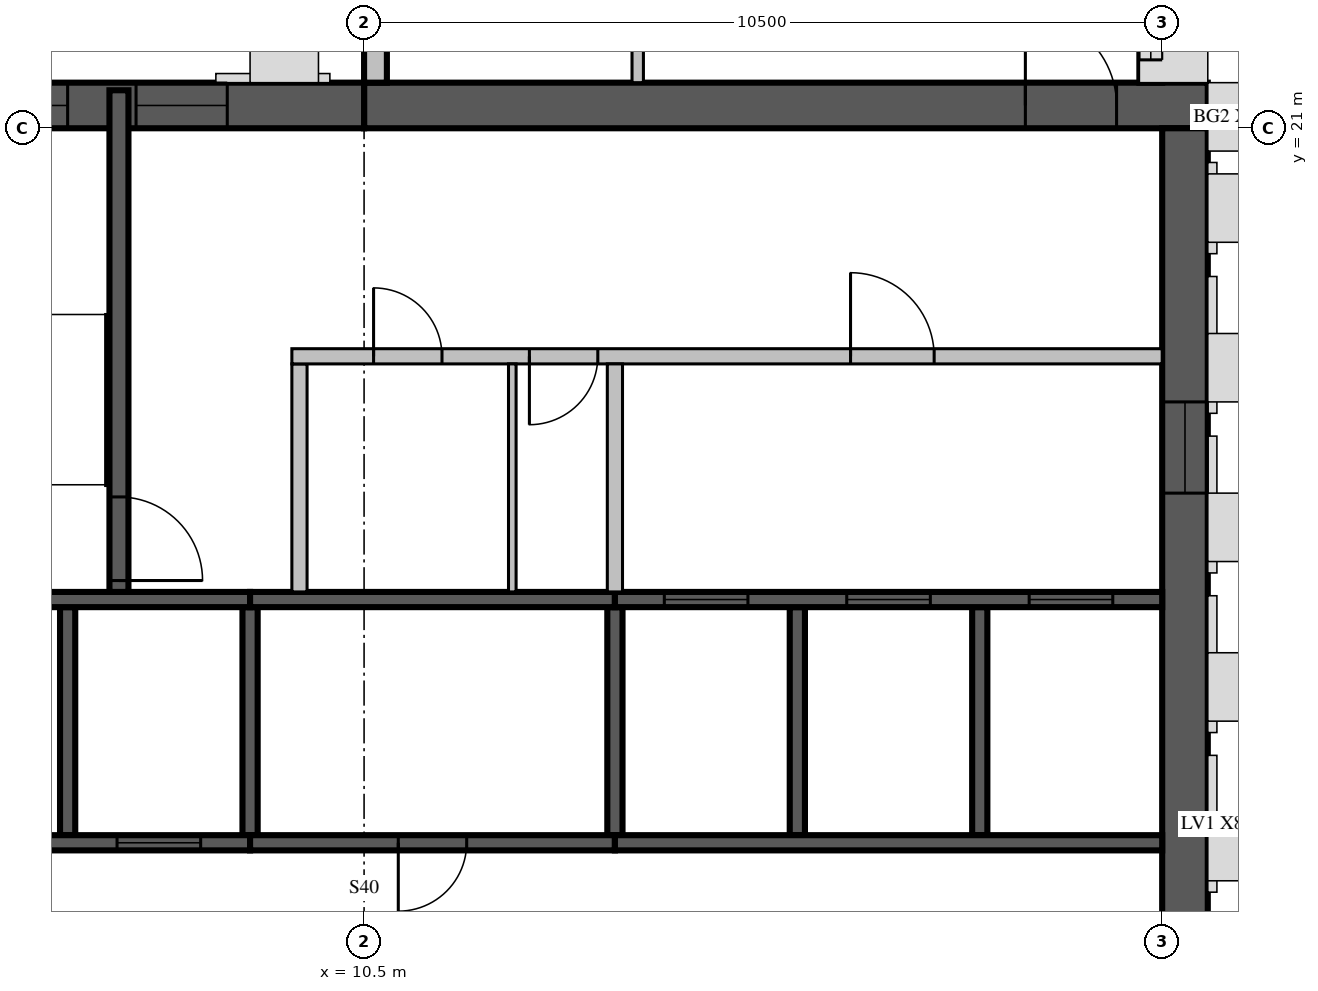
"""IFC4 building model, lengths in metres.
Left out: names, types, materials, properties, quantities, classifications, styles, units other than length and angle.
Written with IfcOpenShell. Run it as: python <this file> out.ifc"""

import sys

from ifc_helpers import new_model, si_unit, direction, frame, frame_2d, origin, place, context, subcontext, project, spatial, rectangle, extrude, source, transform, mapped, element, fill, save


model = new_model("IFC4")
c1 = context("Model", 3, precision=1e-05, world=origin(), true_north=direction((0.0, 1.0)))
c2 = subcontext(c1, "Body", "Model", "MODEL_VIEW")
j1 = project(units=[si_unit("LENGTHUNIT", "METRE"), si_unit("PLANEANGLEUNIT", "RADIAN")], contexts=[c1])
p1 = place(None, origin())
s1 = spatial("IfcSite", under=j1, at=p1, CompositionType="ELEMENT")
p2 = place(p1, origin())
s2 = spatial("IfcBuilding", under=s1, at=p2, CompositionType="ELEMENT")
p3 = place(p2, frame((0.0, 0.0, 365.0)))
s3 = spatial("IfcBuildingStorey", under=s2, at=p3, CompositionType="ELEMENT", Elevation=365.0)
m1 = source(origin(), c2, "Body", "SweptSolid", [
    extrude(rectangle(XDim=11.1, YDim=0.6, at=frame_2d((5.55, 0.0))), origin(), (0.0, 0.0, 1.0), 3.5),
])
p4 = place(p3, frame((10.5, 21.3, 0.0), z_axis=(0.0, 0.0, 1.0), x_axis=(1.0, 0.0, 0.0)))
e1 = element("IfcWall", 1, at=p4, inside=s3, PredefinedType="SHEAR", context=c2, shape_type="MappedRepresentation", body=[
    mapped(m1, transform((0.0, 0.0, 0.0), scale=1.0)),
])
m2 = source(origin(), c2, "Body", "SweptSolid", [
    extrude(rectangle(XDim=1.2, YDim=2.1, at=frame_2d((0.6, 1.05))), frame((0.0, 0.31, 0.0), z_axis=(0.0, -1.0, 0.0), x_axis=(1.0, 0.0, 0.0)), (0.0, 0.0, 1.0), 0.62),
])
p5 = place(p4, frame((8.7, 0.0, 0.0)))
e2 = element("IfcOpeningElement", 2, at=p5, cuts=e1, PredefinedType="OPENING", context=c2, shape_type="MappedRepresentation", body=[
    mapped(m2, transform((0.0, 0.0, 0.0), scale=1.0)),
])
m3 = source(origin(), c2, "Body", "SweptSolid", [
    extrude(rectangle(XDim=10.5, YDim=0.6, at=frame_2d((5.25, 0.0))), origin(), (0.0, 0.0, 1.0), 3.5),
])
p6 = place(p3, frame((21.3, 10.5, 0.0), z_axis=(0.0, 0.0, 1.0), x_axis=(0.0, 1.0, 0.0)))
e3 = element("IfcWall", 3, at=p6, inside=s3, PredefinedType="SHEAR", context=c2, shape_type="MappedRepresentation", body=[
    mapped(m3, transform((0.0, 0.0, 0.0), scale=1.0)),
])
m4 = source(origin(), c2, "Body", "SweptSolid", [
    extrude(rectangle(XDim=1.2, YDim=2.4, at=frame_2d((0.6, 1.2))), frame((0.0, 0.31, 0.0), z_axis=(0.0, -1.0, 0.0), x_axis=(1.0, 0.0, 0.0)), (0.0, 0.0, 1.0), 0.62),
])
p7 = place(p6, frame((5.7, 0.0, 0.6)))
e4 = element("IfcOpeningElement", 4, at=p7, cuts=e3, PredefinedType="OPENING", context=c2, shape_type="MappedRepresentation", body=[
    mapped(m4, transform((0.0, 0.0, 0.0), scale=1.0)),
])
m5 = source(origin(), c2, "Body", "SweptSolid", [
    extrude(rectangle(XDim=6.6, YDim=0.6, at=frame_2d((3.3, 0.0))), origin(), (0.0, 0.0, 1.0), 3.5),
])
p8 = place(p3, frame((3.9, 21.3, 0.0), z_axis=(0.0, 0.0, 1.0), x_axis=(1.0, 0.0, 0.0)))
e5 = element("IfcWall", 5, at=p8, inside=s3, PredefinedType="SHEAR", context=c2, shape_type="MappedRepresentation", body=[
    mapped(m5, transform((0.0, 0.0, 0.0), scale=1.0)),
])
p9 = place(p8, frame((1.5, 0.0, 0.6)))
e6 = element("IfcOpeningElement", 6, at=p9, cuts=e5, PredefinedType="OPENING", context=c2, shape_type="MappedRepresentation", body=[
    mapped(m4, transform((0.0, 0.0, 0.0), scale=1.0)),
])
p10 = place(p8, frame((3.6, 0.0, 0.6)))
e7 = element("IfcOpeningElement", 7, at=p10, cuts=e5, PredefinedType="OPENING", context=c2, shape_type="MappedRepresentation", body=[
    mapped(m4, transform((0.0, 0.0, 0.0), scale=1.0)),
])
m6 = source(origin(), c2, "Body", "SweptSolid", [
    extrude(rectangle(XDim=7.5, YDim=0.3, at=frame_2d((3.75, 0.0))), origin(), (0.0, 0.0, 1.0), 3.05),
])
p11 = place(p3, frame((20.85, 21.6, 0.0), z_axis=(0.0, 0.0, 1.0), x_axis=(0.0, 1.0, 0.0)))
e8 = element("IfcWall", 8, at=p11, inside=s3, PredefinedType="STANDARD", context=c2, shape_type="MappedRepresentation", body=[
    mapped(m6, transform((0.0, 0.0, 0.0), scale=1.0)),
])
m7 = source(origin(), c2, "Body", "SweptSolid", [
    extrude(rectangle(XDim=2.4, YDim=2.0, at=frame_2d((1.2, 1.0))), frame((0.0, 0.16, 0.0), z_axis=(0.0, -1.0, 0.0), x_axis=(1.0, 0.0, 0.0)), (0.0, 0.0, 1.0), 0.32),
])
p12 = place(p11, frame((0.3, 0.0, 0.6)))
e9 = element("IfcOpeningElement", 9, at=p12, cuts=e8, PredefinedType="OPENING", context=c2, shape_type="MappedRepresentation", body=[
    mapped(m7, transform((0.0, 0.0, 0.0), scale=1.0)),
])
m8 = source(origin(), c2, "Body", "SweptSolid", [
    extrude(rectangle(XDim=3.0, YDim=2.0, at=frame_2d((1.5, 1.0))), frame((0.0, 0.16, 0.0), z_axis=(0.0, -1.0, 0.0), x_axis=(1.0, 0.0, 0.0)), (0.0, 0.0, 1.0), 0.32),
])
p13 = place(p11, frame((4.2, 0.0, 0.6)))
e10 = element("IfcOpeningElement", 10, at=p13, cuts=e8, PredefinedType="OPENING", context=c2, shape_type="MappedRepresentation", body=[
    mapped(m8, transform((0.0, 0.0, 0.0), scale=1.0)),
])
p14 = place(p3, frame((10.65, 26.88, 0.0), z_axis=(0.0, 0.0, 1.0), x_axis=(0.0, -1.0, 0.0)))
e11 = element("IfcWall", 11, at=p14, inside=s3, PredefinedType="STANDARD", context=c2, shape_type="SweptSolid", body=[
    extrude(rectangle(XDim=5.28, YDim=0.3, at=frame_2d((2.64, 0.0))), origin(), (0.0, 0.0, 1.0), 3.05),
])
m9 = source(origin(), c2, "Body", "SweptSolid", [
    extrude(rectangle(XDim=3.6, YDim=2.0, at=frame_2d((1.8, 1.0))), frame((0.0, 0.16, 0.0), z_axis=(0.0, -1.0, 0.0), x_axis=(1.0, 0.0, 0.0)), (0.0, 0.0, 1.0), 0.32),
])
p15 = place(p14, frame((1.14, 0.0, 0.6)))
e12 = element("IfcOpeningElement", 12, at=p15, cuts=e11, PredefinedType="OPENING", context=c2, shape_type="MappedRepresentation", body=[
    mapped(m9, transform((0.0, 0.0, 0.0), scale=1.0)),
])
m10 = source(origin(), c2, "Body", "SweptSolid", [
    extrude(rectangle(XDim=3.0, YDim=0.2, at=frame_2d((1.5, 0.0))), origin(), (0.0, 0.0, 1.0), 3.5),
])
p16 = place(p3, frame((6.6, 11.7, 0.0), z_axis=(0.0, 0.0, 1.0), x_axis=(0.0, 1.0, 0.0)))
e13 = element("IfcWall", 13, at=p16, inside=s3, PredefinedType="SOLIDWALL", context=c2, shape_type="MappedRepresentation", body=[
    mapped(m10, transform((0.0, 0.0, 0.0), scale=1.0)),
])
p17 = place(p3, frame((9.0, 11.7, 0.0), z_axis=(0.0, 0.0, 1.0), x_axis=(0.0, 1.0, 0.0)))
e14 = element("IfcWall", 14, at=p17, inside=s3, PredefinedType="SOLIDWALL", context=c2, shape_type="SweptSolid", body=[
    extrude(rectangle(XDim=3.0, YDim=0.2, at=frame_2d((1.5, 0.0))), origin(), (0.0, 0.0, 1.0), 3.05),
])
m11 = source(origin(), c2, "Body", "SweptSolid", [
    extrude(rectangle(XDim=3.0, YDim=0.2, at=frame_2d((1.5, 0.0))), origin(), (0.0, 0.0, 1.0), 3.05),
])
p18 = place(p3, frame((13.8, 11.7, 0.0), z_axis=(0.0, 0.0, 1.0), x_axis=(0.0, 1.0, 0.0)))
e15 = element("IfcWall", 15, at=p18, inside=s3, PredefinedType="SOLIDWALL", context=c2, shape_type="MappedRepresentation", body=[
    mapped(m11, transform((0.0, 0.0, 0.0), scale=1.0)),
])
for number, where, z_axis, x_axis in (
    (16, (16.2, 11.7, 0.0), (0.0, 0.0, 1.0), (0.0, 1.0, 0.0)),
    (17, (18.6, 11.7, 0.0), (0.0, 0.0, 1.0), (0.0, 1.0, 0.0)),
):
    element("IfcWall", number, at=place(p3, frame(where, z_axis=z_axis, x_axis=x_axis)), inside=s3, PredefinedType="SOLIDWALL", context=c2, shape_type="MappedRepresentation", body=[
        mapped(m10, transform((0.0, 0.0, 0.0), scale=1.0)),
    ])
m12 = source(origin(), c2, "Body", "SweptSolid", [
    extrude(rectangle(XDim=4.8, YDim=0.2, at=frame_2d((2.4, 0.0))), origin(), (0.0, 0.0, 1.0), 3.5),
])
p19 = place(p3, frame((4.2, 11.6, 0.0), z_axis=(0.0, 0.0, 1.0), x_axis=(1.0, 0.0, 0.0)))
e18 = element("IfcWall", 18, at=p19, inside=s3, PredefinedType="SOLIDWALL", context=c2, shape_type="MappedRepresentation", body=[
    mapped(m12, transform((0.0, 0.0, 0.0), scale=1.0)),
])
m13 = source(origin(), c2, "Body", "SweptSolid", [
    extrude(rectangle(XDim=1.1, YDim=2.1, at=frame_2d((0.55, 1.05))), frame((0.0, 0.11, 0.0), z_axis=(0.0, -1.0, 0.0), x_axis=(1.0, 0.0, 0.0)), (0.0, 0.0, 1.0), 0.22),
])
p20 = place(p19, frame((0.65, 0.0, 0.0)))
e19 = element("IfcOpeningElement", 19, at=p20, cuts=e18, PredefinedType="OPENING", context=c2, shape_type="MappedRepresentation", body=[
    mapped(m13, transform((0.0, 0.0, 0.0), scale=1.0)),
])
p21 = place(p19, frame((3.05, 0.0, 0.0)))
e20 = element("IfcOpeningElement", 20, at=p21, cuts=e18, PredefinedType="OPENING", context=c2, shape_type="MappedRepresentation", body=[
    mapped(m13, transform((0.0, 0.0, 0.0), scale=1.0)),
])
p22 = place(p3, frame((9.0, 11.6, 0.0), z_axis=(0.0, 0.0, 1.0), x_axis=(1.0, 0.0, 0.0)))
e21 = element("IfcWall", 21, at=p22, inside=s3, PredefinedType="SOLIDWALL", context=c2, shape_type="SweptSolid", body=[
    extrude(rectangle(XDim=4.8, YDim=0.2, at=frame_2d((2.4, 0.0))), origin(), (0.0, 0.0, 1.0), 3.05),
])
m14 = source(origin(), c2, "Body", "SweptSolid", [
    extrude(rectangle(XDim=0.9, YDim=2.1, at=frame_2d((0.45, 1.05))), frame((0.0, 0.11, 0.0), z_axis=(0.0, -1.0, 0.0), x_axis=(1.0, 0.0, 0.0)), (0.0, 0.0, 1.0), 0.22),
])
p23 = place(p22, frame((1.95, 0.0, 0.0)))
e22 = element("IfcOpeningElement", 22, at=p23, cuts=e21, PredefinedType="OPENING", context=c2, shape_type="MappedRepresentation", body=[
    mapped(m14, transform((0.0, 0.0, 0.0), scale=1.0)),
])
m15 = source(origin(), c2, "Body", "SweptSolid", [
    extrude(rectangle(XDim=7.2, YDim=0.2, at=frame_2d((3.6, 0.0))), origin(), (0.0, 0.0, 1.0), 3.5),
])
p24 = place(p3, frame((13.8, 11.6, 0.0), z_axis=(0.0, 0.0, 1.0), x_axis=(1.0, 0.0, 0.0)))
e23 = element("IfcWall", 23, at=p24, inside=s3, PredefinedType="SOLIDWALL", context=c2, shape_type="MappedRepresentation", body=[
    mapped(m15, transform((0.0, 0.0, 0.0), scale=1.0)),
])
p25 = place(p3, frame((4.2, 14.8, 0.0), z_axis=(0.0, 0.0, 1.0), x_axis=(1.0, 0.0, 0.0)))
e24 = element("IfcWall", 24, at=p25, inside=s3, PredefinedType="SOLIDWALL", context=c2, shape_type="MappedRepresentation", body=[
    mapped(m12, transform((0.0, 0.0, 0.0), scale=1.0)),
])
m16 = source(origin(), c2, "Body", "SweptSolid", [
    extrude(rectangle(XDim=4.8, YDim=0.2, at=frame_2d((2.4, 0.0))), origin(), (0.0, 0.0, 1.0), 3.05),
])
p26 = place(p3, frame((9.0, 14.8, 0.0), z_axis=(0.0, 0.0, 1.0), x_axis=(1.0, 0.0, 0.0)))
e25 = element("IfcWall", 25, at=p26, inside=s3, PredefinedType="SOLIDWALL", context=c2, shape_type="MappedRepresentation", body=[
    mapped(m16, transform((0.0, 0.0, 0.0), scale=1.0)),
])
p27 = place(p3, frame((13.8, 14.8, 0.0), z_axis=(0.0, 0.0, 1.0), x_axis=(1.0, 0.0, 0.0)))
e26 = element("IfcWall", 26, at=p27, inside=s3, PredefinedType="SOLIDWALL", context=c2, shape_type="MappedRepresentation", body=[
    mapped(m15, transform((0.0, 0.0, 0.0), scale=1.0)),
])
p28 = place(p27, frame((0.65, 0.0, 0.0)))
e27 = element("IfcOpeningElement", 27, at=p28, cuts=e26, PredefinedType="OPENING", context=c2, shape_type="MappedRepresentation", body=[
    mapped(m13, transform((0.0, 0.0, 0.0), scale=1.0)),
])
p29 = place(p27, frame((3.05, 0.0, 0.0)))
e28 = element("IfcOpeningElement", 28, at=p29, cuts=e26, PredefinedType="OPENING", context=c2, shape_type="MappedRepresentation", body=[
    mapped(m13, transform((0.0, 0.0, 0.0), scale=1.0)),
])
p30 = place(p27, frame((5.45, 0.0, 0.0)))
e29 = element("IfcOpeningElement", 29, at=p30, cuts=e26, PredefinedType="OPENING", context=c2, shape_type="MappedRepresentation", body=[
    mapped(m13, transform((0.0, 0.0, 0.0), scale=1.0)),
])
p31 = place(p3, frame((7.275, 14.9, 0.0), z_axis=(0.0, 0.0, 1.0), x_axis=(0.0, 1.0, 0.0)))
e30 = element("IfcWall", 30, at=p31, inside=s3, PredefinedType="SOLIDWALL", context=c2, shape_type="SweptSolid", body=[
    extrude(rectangle(XDim=6.6, YDim=0.25, at=frame_2d((3.3, 0.0))), origin(), (0.0, 0.0, 1.0), 3.05),
])
m17 = source(origin(), c2, "Body", "SweptSolid", [
    extrude(rectangle(XDim=1.1, YDim=2.1, at=frame_2d((0.55, 1.05))), frame((0.0, 0.135, 0.0), z_axis=(0.0, -1.0, 0.0), x_axis=(1.0, 0.0, 0.0)), (0.0, 0.0, 1.0), 0.27),
])
p32 = place(p31, frame((0.15, 0.0, 0.0)))
e31 = element("IfcOpeningElement", 31, at=p32, cuts=e30, PredefinedType="OPENING", context=c2, shape_type="MappedRepresentation", body=[
    mapped(m17, transform((0.0, 0.0, 0.0), scale=1.0)),
])
p33 = place(p3, frame((9.65, 14.9, 0.0), z_axis=(0.0, 0.0, 1.0), x_axis=(0.0, 1.0, 0.0)))
e32 = element("IfcWall", 32, at=p33, inside=s3, PredefinedType="PARTITIONING", context=c2, shape_type="SweptSolid", body=[
    extrude(rectangle(XDim=3.0, YDim=0.2, at=frame_2d((1.5, 0.0))), origin(), (0.0, 0.0, 1.0), 3.05),
])
p34 = place(p3, frame((9.55, 18.0, 0.0), z_axis=(0.0, 0.0, 1.0), x_axis=(1.0, 0.0, 0.0)))
e33 = element("IfcWall", 33, at=p34, inside=s3, PredefinedType="PARTITIONING", context=c2, shape_type="SweptSolid", body=[
    extrude(rectangle(XDim=11.45, YDim=0.2, at=frame_2d((5.725, 0.0))), origin(), (0.0, 0.0, 1.0), 3.05),
])
p35 = place(p34, frame((1.075, 0.0, 0.0)))
e34 = element("IfcOpeningElement", 34, at=p35, cuts=e33, PredefinedType="OPENING", context=c2, shape_type="MappedRepresentation", body=[
    mapped(m14, transform((0.0, 0.0, 0.0), scale=1.0)),
])
p36 = place(p34, frame((3.125, 0.0, 0.0)))
e35 = element("IfcOpeningElement", 35, at=p36, cuts=e33, PredefinedType="OPENING", context=c2, shape_type="MappedRepresentation", body=[
    mapped(m14, transform((0.0, 0.0, 0.0), scale=1.0)),
])
p37 = place(p34, frame((7.35, 0.0, 0.0)))
e36 = element("IfcOpeningElement", 36, at=p37, cuts=e33, PredefinedType="OPENING", context=c2, shape_type="MappedRepresentation", body=[
    mapped(m13, transform((0.0, 0.0, 0.0), scale=1.0)),
])
m18 = source(origin(), c2, "Body", "SweptSolid", [
    extrude(rectangle(XDim=3.0, YDim=0.2, at=frame_2d((1.5, 0.0))), origin(), (0.0, 0.0, 1.0), 3.05),
])
p38 = place(p3, frame((13.8, 14.9, 0.0), z_axis=(0.0, 0.0, 1.0), x_axis=(0.0, 1.0, 0.0)))
e37 = element("IfcWall", 37, at=p38, inside=s3, PredefinedType="PARTITIONING", context=c2, shape_type="MappedRepresentation", body=[
    mapped(m18, transform((0.0, 0.0, 0.0), scale=1.0)),
])
p39 = place(p3, frame((12.45, 14.9, 0.0), z_axis=(0.0, 0.0, 1.0), x_axis=(0.0, 1.0, 0.0)))
e38 = element("IfcWall", 38, at=p39, inside=s3, PredefinedType="PARTITIONING", context=c2, shape_type="SweptSolid", body=[
    extrude(rectangle(XDim=3.0, YDim=0.1, at=frame_2d((1.5, 0.0))), origin(), (0.0, 0.0, 1.0), 3.05),
])
m19 = source(origin(), c2, "Body", "SweptSolid", [
    extrude(rectangle(XDim=7.725, YDim=0.15, at=frame_2d((3.862, 0.0))), origin(), (0.0, 0.0, 1.0), 3.05),
])
p40 = place(p3, frame((14.1, 29.325, 0.0), z_axis=(0.0, 0.0, 1.0), x_axis=(0.0, -1.0, 0.0)))
e39 = element("IfcWall", 39, at=p40, inside=s3, PredefinedType="PARTITIONING", context=c2, shape_type="MappedRepresentation", body=[
    mapped(m19, transform((0.0, 0.0, 0.0), scale=1.0)),
])
m20 = source(origin(), c2, "Body", "SweptSolid", [
    extrude(rectangle(XDim=2.2, YDim=2.1, at=frame_2d((1.1, 1.05))), frame((0.0, 0.085, 0.0), z_axis=(0.0, -1.0, 0.0), x_axis=(1.0, 0.0, 0.0)), (0.0, 0.0, 1.0), 0.17),
])
p41 = place(p40, frame((4.925, 0.0, 0.0)))
e40 = element("IfcOpeningElement", 40, at=p41, cuts=e39, PredefinedType="OPENING", context=c2, shape_type="MappedRepresentation", body=[
    mapped(m20, transform((0.0, 0.0, 0.0), scale=1.0)),
])
m21 = source(origin(), c2, "Body", "SweptSolid", [
    extrude(rectangle(XDim=2.4, YDim=2.0, at=frame_2d((1.2, 1.0))), frame((0.0, 0.03, 0.0), z_axis=(0.0, -1.0, 0.0), x_axis=(1.0, 0.0, 0.0)), (0.0, 0.0, 1.0), 0.06),
])
p42 = place(p12, origin())
e41 = element("IfcWindow", 41, at=p42, inside=s3, PartitioningType="SINGLE_PANEL", PredefinedType="WINDOW", context=c2, shape_type="MappedRepresentation", body=[
    mapped(m21, transform((0.0, 0.0, 0.0), scale=1.0)),
])
fill(e9, e41)
m22 = source(origin(), c2, "Body", "SweptSolid", [
    extrude(rectangle(XDim=1.1, YDim=2.1, at=frame_2d((0.55, 1.05))), frame((0.0, 0.025, 0.0), z_axis=(0.0, -1.0, 0.0), x_axis=(1.0, 0.0, 0.0)), (0.0, 0.0, 1.0), 0.05),
])
p43 = place(p21, origin())
e42 = element("IfcDoor", 42, at=p43, inside=s3, OperationType="SLIDING_TO_LEFT", PredefinedType="DOOR", context=c2, shape_type="MappedRepresentation", body=[
    mapped(m22, transform((0.0, 0.0, 0.0), scale=1.0)),
])
fill(e20, e42)
m23 = source(origin(), c2, "Body", "SweptSolid", [
    extrude(rectangle(XDim=0.9, YDim=2.1, at=frame_2d((0.45, 1.05))), frame((0.0, 0.025, 0.0), z_axis=(0.0, -1.0, 0.0), x_axis=(1.0, 0.0, 0.0)), (0.0, 0.0, 1.0), 0.05),
])
p44 = place(p23, origin())
e43 = element("IfcDoor", 43, at=p44, inside=s3, OperationType="SINGLE_SWING_RIGHT", PredefinedType="DOOR", context=c2, shape_type="MappedRepresentation", body=[
    mapped(m23, transform((0.0, 0.0, 0.0), scale=1.0)),
])
fill(e22, e43)
p45 = place(p28, origin())
e44 = element("IfcDoor", 44, at=p45, inside=s3, OperationType="SLIDING_TO_LEFT", PredefinedType="DOOR", context=c2, shape_type="MappedRepresentation", body=[
    mapped(m22, transform((0.0, 0.0, 0.0), scale=1.0)),
])
fill(e27, e44)
p46 = place(p29, origin())
e45 = element("IfcDoor", 45, at=p46, inside=s3, OperationType="SLIDING_TO_LEFT", PredefinedType="DOOR", context=c2, shape_type="MappedRepresentation", body=[
    mapped(m22, transform((0.0, 0.0, 0.0), scale=1.0)),
])
fill(e28, e45)
p47 = place(p30, origin())
e46 = element("IfcDoor", 46, at=p47, inside=s3, OperationType="SLIDING_TO_LEFT", PredefinedType="DOOR", context=c2, shape_type="MappedRepresentation", body=[
    mapped(m22, transform((0.0, 0.0, 0.0), scale=1.0)),
])
fill(e29, e46)
p48 = place(p32, origin())
e47 = element("IfcDoor", 47, at=p48, inside=s3, OperationType="SINGLE_SWING_RIGHT", PredefinedType="DOOR", context=c2, shape_type="MappedRepresentation", body=[
    mapped(m22, transform((0.0, 0.0, 0.0), scale=1.0)),
])
fill(e31, e47)
p49 = place(p35, origin())
e48 = element("IfcDoor", 48, at=p49, inside=s3, OperationType="SINGLE_SWING_LEFT", PredefinedType="DOOR", context=c2, shape_type="MappedRepresentation", body=[
    mapped(m23, transform((0.0, 0.0, 0.0), scale=1.0)),
])
fill(e34, e48)
p50 = place(p36, origin())
e49 = element("IfcDoor", 49, at=p50, inside=s3, OperationType="SINGLE_SWING_RIGHT", PredefinedType="DOOR", context=c2, shape_type="MappedRepresentation", body=[
    mapped(m23, transform((0.0, 0.0, 0.0), scale=1.0)),
])
fill(e35, e49)
p51 = place(p37, origin())
e50 = element("IfcDoor", 50, at=p51, inside=s3, OperationType="SINGLE_SWING_LEFT", PredefinedType="DOOR", context=c2, shape_type="MappedRepresentation", body=[
    mapped(m22, transform((0.0, 0.0, 0.0), scale=1.0)),
])
fill(e36, e50)
m24 = source(origin(), c2, "Body", "SweptSolid", [
    extrude(rectangle(XDim=1.2, YDim=2.1, at=frame_2d((0.6, 1.05))), frame((0.0, 0.025, 0.0), z_axis=(0.0, -1.0, 0.0), x_axis=(1.0, 0.0, 0.0)), (0.0, 0.0, 1.0), 0.05),
])
p52 = place(p5, origin())
e51 = element("IfcDoor", 51, at=p52, inside=s3, OperationType="SINGLE_SWING_LEFT", PredefinedType="DOOR", context=c2, shape_type="MappedRepresentation", body=[
    mapped(m24, transform((0.0, 0.0, 0.0), scale=1.0)),
])
fill(e2, e51)
m25 = source(origin(), c2, "Body", "SweptSolid", [
    extrude(rectangle(XDim=1.2, YDim=2.4, at=frame_2d((0.6, 1.2))), frame((0.0, 0.03, 0.0), z_axis=(0.0, -1.0, 0.0), x_axis=(1.0, 0.0, 0.0)), (0.0, 0.0, 1.0), 0.06),
])
p53 = place(p7, origin())
e52 = element("IfcWindow", 52, at=p53, inside=s3, PartitioningType="SINGLE_PANEL", PredefinedType="WINDOW", context=c2, shape_type="MappedRepresentation", body=[
    mapped(m25, transform((0.0, 0.0, 0.0), scale=1.0)),
])
fill(e4, e52)
p54 = place(p9, origin())
e53 = element("IfcWindow", 53, at=p54, inside=s3, PartitioningType="SINGLE_PANEL", PredefinedType="WINDOW", context=c2, shape_type="MappedRepresentation", body=[
    mapped(m25, transform((0.0, 0.0, 0.0), scale=1.0)),
])
fill(e6, e53)
p55 = place(p10, origin())
e54 = element("IfcWindow", 54, at=p55, inside=s3, PartitioningType="SINGLE_PANEL", PredefinedType="WINDOW", context=c2, shape_type="MappedRepresentation", body=[
    mapped(m25, transform((0.0, 0.0, 0.0), scale=1.0)),
])
fill(e7, e54)
save(model, sys.argv[1])
